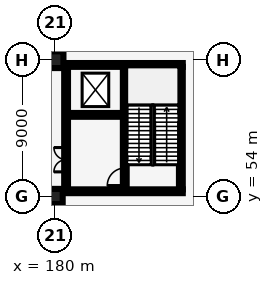
"""IFC4 building model, lengths in metres.
Left out: names, types, materials, properties, quantities, classifications, styles, units other than length and angle.
Written with IfcOpenShell. Run it as: python <this file> out.ifc"""

import sys

from ifc_helpers import new_model, si_unit, direction, frame, frame_2d, origin, origin_2d, place, context, subcontext, project, spatial, rectangle, extrude, element, fill, save


model = new_model("IFC4")
c1 = context("Model", 3, precision=1e-05, world=origin(), true_north=direction((0.0, 1.0)))
c2 = subcontext(c1, "Body", "Model", "MODEL_VIEW")
j1 = project(units=[si_unit("LENGTHUNIT", "METRE"), si_unit("PLANEANGLEUNIT", "RADIAN")], contexts=[c1])
p1 = place(None, origin())
s1 = spatial("IfcSite", under=j1, at=p1, CompositionType="ELEMENT")
p2 = place(p1, origin())
s2 = spatial("IfcBuilding", under=s1, at=p2, CompositionType="ELEMENT")
p3 = place(p2, frame((0.0, 0.0, -5.0)))
s3 = spatial("IfcBuildingStorey", under=s2, at=p3, CompositionType="ELEMENT", Elevation=-5.0)
p4 = place(p3, frame((180.0, 54.0, 0.0), z_axis=(0.0, 0.0, 1.0), x_axis=(1.0, 0.0, 0.0)))
e1 = element("IfcColumn", 1, at=p4, inside=s3, PredefinedType="COLUMN", context=c2, shape_type="SweptSolid", body=[
    extrude(rectangle(XDim=1.0, YDim=1.0, at=origin_2d()), origin(), (0.0, 0.0, 1.0), 5.0),
])
p5 = place(p3, frame((180.0, 63.0, 0.0), z_axis=(0.0, 0.0, 1.0), x_axis=(1.0, 0.0, 0.0)))
e2 = element("IfcColumn", 2, at=p5, inside=s3, PredefinedType="COLUMN", context=c2, shape_type="SweptSolid", body=[
    extrude(rectangle(XDim=1.1, YDim=1.1, at=origin_2d()), origin(), (0.0, 0.0, 1.0), 5.0),
])
p6 = place(p3, frame((180.725, 54.47, 0.0), z_axis=(0.0, 0.0, 1.0), x_axis=(0.0, 1.0, 0.0)))
e3 = element("IfcWall", 3, at=p6, inside=s3, PredefinedType="SHEAR", context=c2, shape_type="SweptSolid", body=[
    extrude(rectangle(XDim=8.06, YDim=0.25, at=frame_2d((4.03, 0.0))), origin(), (0.0, 0.0, 1.0), 4.64),
])
p7 = place(p6, frame((1.15, 0.0, 0.0)))
e4 = element("IfcOpeningElement", 4, at=p7, cuts=e3, PredefinedType="OPENING", context=c2, shape_type="SweptSolid", body=[
    extrude(rectangle(XDim=1.6, YDim=2.2, at=frame_2d((0.8, 1.1))), frame((0.0, 0.135, 0.0), z_axis=(0.0, -1.0, 0.0), x_axis=(1.0, 0.0, 0.0)), (0.0, 0.0, 1.0), 0.27),
])
p8 = place(p3, frame((188.275, 54.47, 0.0), z_axis=(0.0, 0.0, 1.0), x_axis=(0.0, 1.0, 0.0)))
e5 = element("IfcWall", 5, at=p8, inside=s3, PredefinedType="SHEAR", context=c2, shape_type="SweptSolid", body=[
    extrude(rectangle(XDim=8.06, YDim=0.25, at=frame_2d((4.03, 0.0))), origin(), (0.0, 0.0, 1.0), 4.64),
])
for number, where, z_axis, x_axis in (
    (6, (180.6, 54.345, 0.0), (0.0, 0.0, 1.0), (1.0, 0.0, 0.0)),
    (7, (180.6, 62.655, 0.0), (0.0, 0.0, 1.0), (1.0, 0.0, 0.0)),
):
    element("IfcWall", number, at=place(p3, frame(where, z_axis=z_axis, x_axis=x_axis)), inside=s3, PredefinedType="SHEAR", context=c2, shape_type="SweptSolid", body=[
        extrude(rectangle(XDim=7.8, YDim=0.25, at=frame_2d((3.9, 0.0))), origin(), (0.0, 0.0, 1.0), 4.64),
    ])
p9 = place(p3, frame((184.585, 54.47, 0.0), z_axis=(0.0, 0.0, 1.0), x_axis=(0.0, 1.0, 0.0)))
e8 = element("IfcWall", 8, at=p9, inside=s3, PredefinedType="SHEAR", context=c2, shape_type="SweptSolid", body=[
    extrude(rectangle(XDim=8.06, YDim=0.25, at=frame_2d((4.03, 0.0))), origin(), (0.0, 0.0, 1.0), 4.64),
])
p10 = place(p9, frame((0.25, 0.0, 0.0)))
e9 = element("IfcOpeningElement", 9, at=p10, cuts=e8, PredefinedType="OPENING", context=c2, shape_type="SweptSolid", body=[
    extrude(rectangle(XDim=1.15, YDim=2.15, at=frame_2d((0.575, 1.075))), frame((0.0, 0.135, 0.0), z_axis=(0.0, -1.0, 0.0), x_axis=(1.0, 0.0, 0.0)), (0.0, 0.0, 1.0), 0.27),
])
p11 = place(p3, frame((180.85, 59.37, 0.0), z_axis=(0.0, 0.0, 1.0), x_axis=(1.0, 0.0, 0.0)))
e10 = element("IfcWall", 10, at=p11, inside=s3, PredefinedType="SHEAR", context=c2, shape_type="SweptSolid", body=[
    extrude(rectangle(XDim=3.61, YDim=0.25, at=frame_2d((1.805, 0.0))), origin(), (0.0, 0.0, 1.0), 4.64),
])
p12 = place(p11, frame((0.95, 0.0, 0.0)))
e11 = element("IfcOpeningElement", 11, at=p12, cuts=e10, PredefinedType="OPENING", context=c2, shape_type="SweptSolid", body=[
    extrude(rectangle(XDim=1.2, YDim=2.2, at=frame_2d((0.6, 1.1))), frame((0.0, 0.135, 0.0), z_axis=(0.0, -1.0, 0.0), x_axis=(1.0, 0.0, 0.0)), (0.0, 0.0, 1.0), 0.27),
])
p13 = place(p10, origin())
e12 = element("IfcDoor", 12, at=p13, inside=s3, OperationType="SINGLE_SWING_LEFT", PredefinedType="DOOR", context=c2, shape_type="SweptSolid", body=[
    extrude(rectangle(XDim=1.15, YDim=2.15, at=frame_2d((0.575, 1.075))), frame((0.0, 0.025, 0.0), z_axis=(0.0, -1.0, 0.0), x_axis=(1.0, 0.0, 0.0)), (0.0, 0.0, 1.0), 0.05),
])
fill(e9, e12)
p14 = place(p12, origin())
e13 = element("IfcDoor", 13, at=p14, inside=s3, OperationType="DOUBLE_DOOR_SLIDING", PredefinedType="DOOR", context=c2, shape_type="SweptSolid", body=[
    extrude(rectangle(XDim=1.2, YDim=2.2, at=frame_2d((0.6, 1.1))), frame((0.0, 0.025, 0.0), z_axis=(0.0, -1.0, 0.0), x_axis=(1.0, 0.0, 0.0)), (0.0, 0.0, 1.0), 0.05),
])
fill(e11, e13)
p15 = place(p7, origin())
e14 = element("IfcDoor", 14, at=p15, inside=s3, OperationType="DOUBLE_DOOR_SINGLE_SWING", PredefinedType="DOOR", context=c2, shape_type="SweptSolid", body=[
    extrude(rectangle(XDim=1.6, YDim=2.2, at=frame_2d((0.8, 1.1))), frame((0.0, 0.025, 0.0), z_axis=(0.0, -1.0, 0.0), x_axis=(1.0, 0.0, 0.0)), (0.0, 0.0, 1.0), 0.05),
])
fill(e4, e14)
save(model, sys.argv[1])
